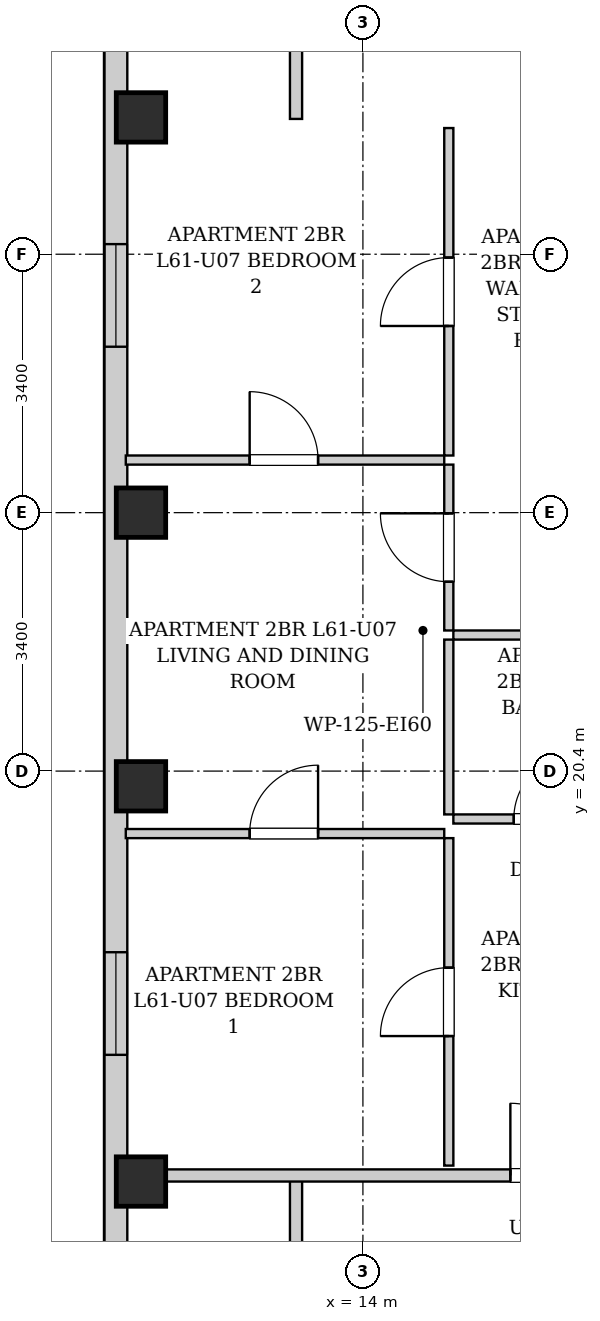
"""IFC4 building model, lengths in metres.
Left out: names, types, materials, properties, quantities, classifications, styles, units other than length and angle.
Written with IfcOpenShell. Run it as: python <this file> out.ifc"""

import sys

from ifc_helpers import new_model, si_unit, direction, frame, frame_2d, origin, origin_2d, place, context, subcontext, project, spatial, rectangle, extrude, element, fill, save


model = new_model("IFC4")
c1 = context("Model", 3, precision=1e-05, world=origin(), true_north=direction((0.0, 1.0)))
c2 = subcontext(c1, "Body", "Model", "MODEL_VIEW")
j1 = project(units=[si_unit("LENGTHUNIT", "METRE"), si_unit("PLANEANGLEUNIT", "RADIAN")], contexts=[c1])
p1 = place(None, origin())
s1 = spatial("IfcSite", under=j1, at=p1, CompositionType="ELEMENT")
p2 = place(p1, origin())
s2 = spatial("IfcBuilding", under=s1, at=p2, CompositionType="ELEMENT")
p3 = place(p2, frame((0.0, 0.0, 210.7)))
s3 = spatial("IfcBuildingStorey", under=s2, at=p3, CompositionType="ELEMENT", Elevation=210.7)
for number, where, z_axis, x_axis in (
    (1, (11.08, 15.0, 0.0), (0.0, 0.0, 1.0), (1.0, 0.0, 0.0)),
    (2, (11.08, 20.2, 0.0), (0.0, 0.0, 1.0), (1.0, 0.0, 0.0)),
    (3, (11.08, 23.8, 0.0), (0.0, 0.0, 1.0), (1.0, 0.0, 0.0)),
    (4, (11.08, 29.0, 0.0), (0.0, 0.0, 1.0), (1.0, 0.0, 0.0)),
):
    element("IfcColumn", number, at=place(p3, frame(where, z_axis=z_axis, x_axis=x_axis)), inside=s3, PredefinedType="COLUMN", context=c2, shape_type="SweptSolid", body=[
        extrude(rectangle(XDim=0.65, YDim=0.65, at=origin_2d()), origin(), (0.0, 0.0, 1.0), 3.3),
    ])
p4 = place(p3, frame((10.75, 6.3, 0.0), z_axis=(0.0, 0.0, 1.0), x_axis=(0.0, 1.0, 0.0)))
e5 = element("IfcWall", 5, at=p4, inside=s3, PredefinedType="SOLIDWALL", context=c2, shape_type="SweptSolid", body=[
    extrude(rectangle(XDim=31.4, YDim=0.3, at=frame_2d((15.7, 0.0))), origin(), (0.0, 0.0, 1.0), 3.04),
])
p5 = place(p4, frame((28.396, 0.0, 0.55)))
e6 = element("IfcOpeningElement", 6, at=p5, cuts=e5, PredefinedType="OPENING", context=c2, shape_type="SweptSolid", body=[
    extrude(rectangle(XDim=1.35, YDim=1.2, at=frame_2d((0.675, 0.6))), frame((0.0, 0.16, 0.0), z_axis=(0.0, -1.0, 0.0), x_axis=(1.0, 0.0, 0.0)), (0.0, 0.0, 1.0), 0.32),
])
p6 = place(p4, frame((10.367, 0.0, 0.55)))
e7 = element("IfcOpeningElement", 7, at=p6, cuts=e5, PredefinedType="OPENING", context=c2, shape_type="SweptSolid", body=[
    extrude(rectangle(XDim=1.35, YDim=1.2, at=frame_2d((0.675, 0.6))), frame((0.0, 0.16, 0.0), z_axis=(0.0, -1.0, 0.0), x_axis=(1.0, 0.0, 0.0)), (0.0, 0.0, 1.0), 0.32),
])
p7 = place(p4, frame((19.683, 0.0, 0.55)))
e8 = element("IfcOpeningElement", 8, at=p7, cuts=e5, PredefinedType="OPENING", context=c2, shape_type="SweptSolid", body=[
    extrude(rectangle(XDim=1.35, YDim=1.2, at=frame_2d((0.675, 0.6))), frame((0.0, 0.16, 0.0), z_axis=(0.0, -1.0, 0.0), x_axis=(1.0, 0.0, 0.0)), (0.0, 0.0, 1.0), 0.32),
])
for number, where, z_axis, x_axis in (
    (9, (13.12, 13.51, 0.0), (0.0, 0.0, 1.0), (0.0, 1.0, 0.0)),
    (10, (13.12, 28.98, 0.0), (0.0, 0.0, 1.0), (0.0, 1.0, 0.0)),
):
    element("IfcWall", number, at=place(p3, frame(where, z_axis=z_axis, x_axis=x_axis)), inside=s3, PredefinedType="PARTITIONING", context=c2, shape_type="SweptSolid", body=[
        extrude(rectangle(XDim=1.58, YDim=0.16, at=frame_2d((0.79, 0.0))), origin(), (0.0, 0.0, 1.0), 3.04),
    ])
p8 = place(p3, frame((10.88, 15.08, 0.0), z_axis=(0.0, 0.0, 1.0), x_axis=(1.0, 0.0, 0.0)))
e11 = element("IfcWall", 11, at=p8, inside=s3, PredefinedType="PARTITIONING", context=c2, shape_type="SweptSolid", body=[
    extrude(rectangle(XDim=6.88, YDim=0.16, at=frame_2d((3.44, 0.0))), origin(), (0.0, 0.0, 1.0), 2.556),
])
p9 = place(p8, frame((5.06, 0.0, 0.0)))
e12 = element("IfcOpeningElement", 12, at=p9, cuts=e11, PredefinedType="OPENING", context=c2, shape_type="SweptSolid", body=[
    extrude(rectangle(XDim=0.95, YDim=2.1, at=frame_2d((0.475, 1.05))), frame((0.0, 0.09, 0.0), z_axis=(0.0, -1.0, 0.0), x_axis=(1.0, 0.0, 0.0)), (0.0, 0.0, 1.0), 0.18),
])
p10 = place(p3, frame((15.19, 22.19, 0.0), z_axis=(0.0, 0.0, 1.0), x_axis=(1.0, 0.0, 0.0)))
e13 = element("IfcWall", 13, at=p10, inside=s3, PredefinedType="PARTITIONING", context=c2, shape_type="SweptSolid", body=[
    extrude(rectangle(XDim=2.45, YDim=0.12, at=frame_2d((1.225, 0.0))), origin(), (0.0, 0.0, 1.0), 3.04),
])
p11 = place(p3, frame((15.13, 22.25, 0.0), z_axis=(0.0, 0.0, 1.0), x_axis=(0.0, 1.0, 0.0)))
e14 = element("IfcWall", 14, at=p11, inside=s3, PredefinedType="PARTITIONING", context=c2, shape_type="SweptSolid", body=[
    extrude(rectangle(XDim=2.182, YDim=0.12, at=frame_2d((1.091, 0.0))), origin(), (0.0, 0.0, 1.0), 3.04),
])
p12 = place(p11, frame((0.641, 0.0, 0.0)))
e15 = element("IfcOpeningElement", 15, at=p12, cuts=e14, PredefinedType="OPENING", context=c2, shape_type="SweptSolid", body=[
    extrude(rectangle(XDim=0.9, YDim=2.05, at=frame_2d((0.45, 1.025))), frame((0.0, 0.07, 0.0), z_axis=(0.0, -1.0, 0.0), x_axis=(1.0, 0.0, 0.0)), (0.0, 0.0, 1.0), 0.14),
])
p13 = place(p3, frame((15.13, 24.552, 0.0), z_axis=(0.0, 0.0, 1.0), x_axis=(0.0, 1.0, 0.0)))
e16 = element("IfcWall", 16, at=p13, inside=s3, PredefinedType="PARTITIONING", context=c2, shape_type="SweptSolid", body=[
    extrude(rectangle(XDim=4.308, YDim=0.12, at=frame_2d((2.154, 0.0))), origin(), (0.0, 0.0, 1.0), 3.04),
])
p14 = place(p13, frame((1.704, 0.0, 0.0)))
e17 = element("IfcOpeningElement", 17, at=p14, cuts=e16, PredefinedType="OPENING", context=c2, shape_type="SweptSolid", body=[
    extrude(rectangle(XDim=0.9, YDim=2.05, at=frame_2d((0.45, 1.025))), frame((0.0, 0.07, 0.0), z_axis=(0.0, -1.0, 0.0), x_axis=(1.0, 0.0, 0.0)), (0.0, 0.0, 1.0), 0.14),
])
p15 = place(p3, frame((15.19, 19.77, 0.0), z_axis=(0.0, 0.0, 1.0), x_axis=(1.0, 0.0, 0.0)))
e18 = element("IfcWall", 18, at=p15, inside=s3, PredefinedType="PARTITIONING", context=c2, shape_type="SweptSolid", body=[
    extrude(rectangle(XDim=2.45, YDim=0.12, at=frame_2d((1.225, 0.0))), origin(), (0.0, 0.0, 1.0), 3.04),
])
p16 = place(p15, frame((0.795, 0.0, 0.0)))
e19 = element("IfcOpeningElement", 19, at=p16, cuts=e18, PredefinedType="OPENING", context=c2, shape_type="SweptSolid", body=[
    extrude(rectangle(XDim=0.86, YDim=2.05, at=frame_2d((0.43, 1.025))), frame((0.0, 0.07, 0.0), z_axis=(0.0, -1.0, 0.0), x_axis=(1.0, 0.0, 0.0)), (0.0, 0.0, 1.0), 0.14),
])
p17 = place(p3, frame((15.13, 19.83, 0.0), z_axis=(0.0, 0.0, 1.0), x_axis=(0.0, 1.0, 0.0)))
e20 = element("IfcWall", 20, at=p17, inside=s3, PredefinedType="PARTITIONING", context=c2, shape_type="SweptSolid", body=[
    extrude(rectangle(XDim=2.3, YDim=0.12, at=frame_2d((1.15, 0.0))), origin(), (0.0, 0.0, 1.0), 3.04),
])
p18 = place(p3, frame((15.13, 15.21, 0.0), z_axis=(0.0, 0.0, 1.0), x_axis=(0.0, 1.0, 0.0)))
e21 = element("IfcWall", 21, at=p18, inside=s3, PredefinedType="PARTITIONING", context=c2, shape_type="SweptSolid", body=[
    extrude(rectangle(XDim=4.308, YDim=0.12, at=frame_2d((2.154, 0.0))), origin(), (0.0, 0.0, 1.0), 3.04),
])
p19 = place(p18, frame((1.704, 0.0, 0.0)))
e22 = element("IfcOpeningElement", 22, at=p19, cuts=e21, PredefinedType="OPENING", context=c2, shape_type="SweptSolid", body=[
    extrude(rectangle(XDim=0.9, YDim=2.05, at=frame_2d((0.45, 1.025))), frame((0.0, 0.07, 0.0), z_axis=(0.0, -1.0, 0.0), x_axis=(1.0, 0.0, 0.0)), (0.0, 0.0, 1.0), 0.14),
])
p20 = place(p3, frame((10.88, 19.578, 0.0), z_axis=(0.0, 0.0, 1.0), x_axis=(1.0, 0.0, 0.0)))
e23 = element("IfcWall", 23, at=p20, inside=s3, PredefinedType="PARTITIONING", context=c2, shape_type="SweptSolid", body=[
    extrude(rectangle(XDim=4.19, YDim=0.12, at=frame_2d((2.095, 0.0))), origin(), (0.0, 0.0, 1.0), 3.04),
])
p21 = place(p20, frame((1.63, 0.0, 0.0)))
e24 = element("IfcOpeningElement", 24, at=p21, cuts=e23, PredefinedType="OPENING", context=c2, shape_type="SweptSolid", body=[
    extrude(rectangle(XDim=0.9, YDim=2.05, at=frame_2d((0.45, 1.025))), frame((0.0, 0.07, 0.0), z_axis=(0.0, -1.0, 0.0), x_axis=(1.0, 0.0, 0.0)), (0.0, 0.0, 1.0), 0.14),
])
p22 = place(p3, frame((10.88, 24.492, 0.0), z_axis=(0.0, 0.0, 1.0), x_axis=(1.0, 0.0, 0.0)))
e25 = element("IfcWall", 25, at=p22, inside=s3, PredefinedType="PARTITIONING", context=c2, shape_type="SweptSolid", body=[
    extrude(rectangle(XDim=4.19, YDim=0.12, at=frame_2d((2.095, 0.0))), origin(), (0.0, 0.0, 1.0), 2.722),
])
p23 = place(p22, frame((1.63, 0.0, 0.0)))
e26 = element("IfcOpeningElement", 26, at=p23, cuts=e25, PredefinedType="OPENING", context=c2, shape_type="SweptSolid", body=[
    extrude(rectangle(XDim=0.9, YDim=2.05, at=frame_2d((0.45, 1.025))), frame((0.0, 0.07, 0.0), z_axis=(0.0, -1.0, 0.0), x_axis=(1.0, 0.0, 0.0)), (0.0, 0.0, 1.0), 0.14),
])
p24 = place(p9, origin())
e27 = element("IfcDoor", 27, at=p24, inside=s3, OperationType="SINGLE_SWING_LEFT", PredefinedType="DOOR", context=c2, shape_type="SweptSolid", body=[
    extrude(rectangle(XDim=0.95, YDim=2.1, at=frame_2d((0.475, 1.05))), frame((0.0, 0.025, 0.0), z_axis=(0.0, -1.0, 0.0), x_axis=(1.0, 0.0, 0.0)), (0.0, 0.0, 1.0), 0.05),
])
fill(e12, e27)
p25 = place(p12, origin())
e28 = element("IfcDoor", 28, at=p25, inside=s3, OperationType="SINGLE_SWING_RIGHT", PredefinedType="DOOR", context=c2, shape_type="SweptSolid", body=[
    extrude(rectangle(XDim=0.9, YDim=2.05, at=frame_2d((0.45, 1.025))), frame((0.0, 0.025, 0.0), z_axis=(0.0, -1.0, 0.0), x_axis=(1.0, 0.0, 0.0)), (0.0, 0.0, 1.0), 0.05),
])
fill(e15, e28)
p26 = place(p14, origin())
e29 = element("IfcDoor", 29, at=p26, inside=s3, OperationType="SINGLE_SWING_LEFT", PredefinedType="DOOR", context=c2, shape_type="SweptSolid", body=[
    extrude(rectangle(XDim=0.9, YDim=2.05, at=frame_2d((0.45, 1.025))), frame((0.0, 0.025, 0.0), z_axis=(0.0, -1.0, 0.0), x_axis=(1.0, 0.0, 0.0)), (0.0, 0.0, 1.0), 0.05),
])
fill(e17, e29)
p27 = place(p16, origin())
e30 = element("IfcDoor", 30, at=p27, inside=s3, OperationType="SINGLE_SWING_RIGHT", PredefinedType="DOOR", context=c2, shape_type="SweptSolid", body=[
    extrude(rectangle(XDim=0.86, YDim=2.05, at=frame_2d((0.43, 1.025))), frame((0.0, 0.025, 0.0), z_axis=(0.0, -1.0, 0.0), x_axis=(1.0, 0.0, 0.0)), (0.0, 0.0, 1.0), 0.05),
])
fill(e19, e30)
p28 = place(p19, origin())
e31 = element("IfcDoor", 31, at=p28, inside=s3, OperationType="SINGLE_SWING_LEFT", PredefinedType="DOOR", context=c2, shape_type="SweptSolid", body=[
    extrude(rectangle(XDim=0.9, YDim=2.05, at=frame_2d((0.45, 1.025))), frame((0.0, 0.025, 0.0), z_axis=(0.0, -1.0, 0.0), x_axis=(1.0, 0.0, 0.0)), (0.0, 0.0, 1.0), 0.05),
])
fill(e22, e31)
p29 = place(p21, origin())
e32 = element("IfcDoor", 32, at=p29, inside=s3, OperationType="SINGLE_SWING_RIGHT", PredefinedType="DOOR", context=c2, shape_type="SweptSolid", body=[
    extrude(rectangle(XDim=0.9, YDim=2.05, at=frame_2d((0.45, 1.025))), frame((0.0, 0.025, 0.0), z_axis=(0.0, -1.0, 0.0), x_axis=(1.0, 0.0, 0.0)), (0.0, 0.0, 1.0), 0.05),
])
fill(e24, e32)
p30 = place(p23, origin())
e33 = element("IfcDoor", 33, at=p30, inside=s3, OperationType="SINGLE_SWING_LEFT", PredefinedType="DOOR", context=c2, shape_type="SweptSolid", body=[
    extrude(rectangle(XDim=0.9, YDim=2.05, at=frame_2d((0.45, 1.025))), frame((0.0, 0.025, 0.0), z_axis=(0.0, -1.0, 0.0), x_axis=(1.0, 0.0, 0.0)), (0.0, 0.0, 1.0), 0.05),
])
fill(e26, e33)
p31 = place(p6, origin())
e34 = element("IfcWindow", 34, at=p31, inside=s3, PartitioningType="SINGLE_PANEL", PredefinedType="WINDOW", context=c2, shape_type="SweptSolid", body=[
    extrude(rectangle(XDim=1.35, YDim=1.2, at=frame_2d((0.675, 0.6))), frame((0.0, 0.03, 0.0), z_axis=(0.0, -1.0, 0.0), x_axis=(1.0, 0.0, 0.0)), (0.0, 0.0, 1.0), 0.06),
])
fill(e7, e34)
p32 = place(p7, origin())
e35 = element("IfcWindow", 35, at=p32, inside=s3, PartitioningType="SINGLE_PANEL", PredefinedType="WINDOW", context=c2, shape_type="SweptSolid", body=[
    extrude(rectangle(XDim=1.35, YDim=1.2, at=frame_2d((0.675, 0.6))), frame((0.0, 0.03, 0.0), z_axis=(0.0, -1.0, 0.0), x_axis=(1.0, 0.0, 0.0)), (0.0, 0.0, 1.0), 0.06),
])
fill(e8, e35)
save(model, sys.argv[1])
